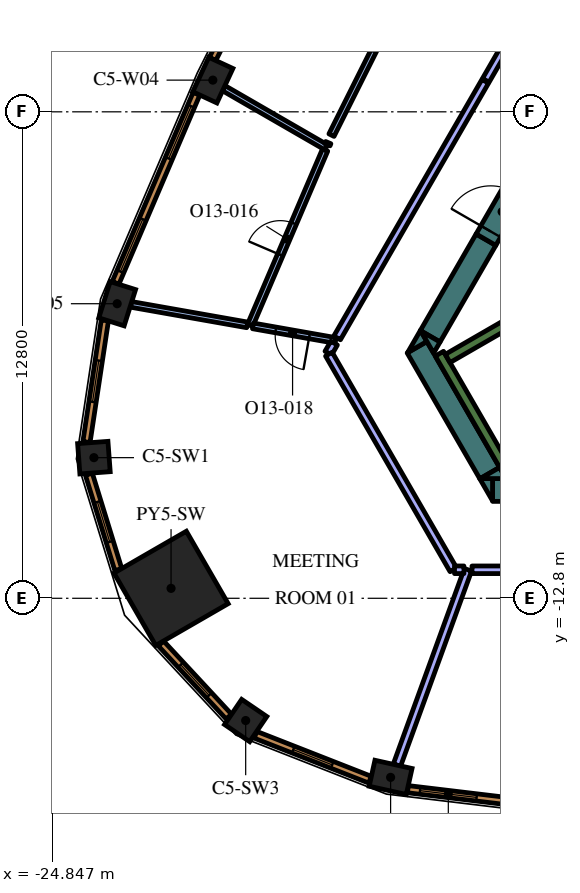
"""IFC4 building model, lengths in metres.
Left out: names, types, materials, properties, quantities, classifications, styles, units other than length and angle.
Written with IfcOpenShell. Run it as: python <this file> out.ifc"""

import sys

from ifc_helpers import new_model, si_unit, direction, frame, frame_2d, origin, origin_2d, place, context, subcontext, project, spatial, polyline, rectangle, outline, extrude, element, fill, save


model = new_model("IFC4")
c1 = context("Model", 3, precision=1e-05, world=origin(), true_north=direction((0.0, 1.0)))
c2 = subcontext(c1, "Body", "Model", "MODEL_VIEW")
j1 = project(units=[si_unit("LENGTHUNIT", "METRE"), si_unit("PLANEANGLEUNIT", "RADIAN")], contexts=[c1])
p1 = place(None, origin())
s1 = spatial("IfcSite", under=j1, at=p1, CompositionType="ELEMENT")
p2 = place(p1, origin())
s2 = spatial("IfcBuilding", under=s1, at=p2, CompositionType="ELEMENT")
p3 = place(p2, frame((0.0, 0.0, 300.6)))
s3 = spatial("IfcBuildingStorey", under=s2, at=p3, CompositionType="ELEMENT", Elevation=300.6)
p4 = place(p3, frame((-21.718, -12.539, 0.0), z_axis=(0.0, 0.0, 1.0), x_axis=(-0.866025403784, -0.5, 0.0)))
e1 = element("IfcColumn", 1, at=p4, inside=s3, PredefinedType="COLUMN", context=c2, shape_type="SweptSolid", body=[
    extrude(rectangle(XDim=2.2, YDim=2.2, at=origin_2d()), origin(), (0.0, 0.0, 1.0), 4.2),
])
for number, where, z_axis, x_axis in (
    (2, (-15.941, -17.512, 0.0), (0.0, 0.0, 1.0), (0.976, -0.217, 0.0)),
    (3, (-20.619, 0.834, 0.0), (0.0, 0.0, 1.0), (-0.421, -0.907, 0.0)),
    (4, (-23.136, -5.049, 0.0), (0.0, 0.0, 1.0), (-0.3, -0.954, 0.0)),
):
    element("IfcColumn", number, at=place(p3, frame(where, z_axis=z_axis, x_axis=x_axis)), inside=s3, PredefinedType="COLUMN", context=c2, shape_type="SweptSolid", body=[
        extrude(rectangle(XDim=1.0, YDim=0.7, at=origin_2d()), origin(), (0.0, 0.0, 1.0), 4.2),
    ])
for number, where, z_axis, x_axis in (
    (5, (-23.748, -9.1, 0.0), (0.0, 0.0, 1.0), (0.075, -0.997, 0.0)),
    (6, (-19.754, -16.017, 0.0), (0.0, 0.0, 1.0), (0.826, -0.563, 0.0)),
):
    element("IfcColumn", number, at=place(p3, frame(where, z_axis=z_axis, x_axis=x_axis)), inside=s3, PredefinedType="COLUMN", context=c2, shape_type="SweptSolid", body=[
        extrude(rectangle(XDim=0.8, YDim=0.8, at=origin_2d()), origin(), (0.0, 0.0, 1.0), 4.2),
    ])
p5 = place(p3, frame((8.904, -9.95, 0.0), z_axis=(0.0, 0.0, 1.0), x_axis=(-1.0, 0.0, 0.0)))
e7 = element("IfcWall", 7, at=p5, inside=s3, PredefinedType="SOLIDWALL", context=c2, shape_type="SweptSolid", body=[
    extrude(rectangle(XDim=22.161, YDim=0.6, at=frame_2d((11.081, 0.0))), origin(), (0.0, 0.0, 1.0), 4.2),
])
p6 = place(p3, origin())
e8 = element("IfcWall", 8, at=p6, inside=s3, PredefinedType="SOLIDWALL", context=c2, shape_type="SweptSolid", body=[
    extrude(outline(polyline([(-13.597, -9.65), (-13.259, -9.65), (-13.259, -10.236), (-13.597, -9.65)])), origin(), (0.0, 0.0, 1.0), 4.2),
])
p7 = place(p3, frame((-13.333, -9.506, 0.0), z_axis=(0.0, 0.0, 1.0), x_axis=(-0.500019073792, 0.866014391245, 0.0)))
e9 = element("IfcWall", 9, at=p7, inside=s3, PredefinedType="SOLIDWALL", context=c2, shape_type="SweptSolid", body=[
    extrude(rectangle(XDim=3.823, YDim=0.6, at=frame_2d((1.912, 0.0))), origin(), (0.0, 0.0, 1.0), 4.2),
])
e10 = element("IfcWall", 10, at=p6, inside=s3, PredefinedType="SOLIDWALL", context=c2, shape_type="SweptSolid", body=[
    extrude(outline(polyline([(-14.987, -6.043), (-15.493, -6.335), (-15.156, -5.75), (-14.987, -6.043)])), origin(), (0.0, 0.0, 1.0), 4.2),
])
e11 = element("IfcWall", 11, at=p6, inside=s3, PredefinedType="SOLIDWALL", context=c2, shape_type="SweptSolid", body=[
    extrude(outline(polyline([(-12.904, -9.65), (-13.58, -9.65), (-13.073, -9.357), (-12.904, -9.65)])), origin(), (0.0, 0.0, 1.0), 4.2),
])
p8 = place(p3, frame((-13.432, -3.364, 0.0), z_axis=(0.0, 0.0, 1.0), x_axis=(-0.499960127962, -0.866048422692, 0.0)))
e12 = element("IfcWall", 12, at=p8, inside=s3, PredefinedType="SOLIDWALL", context=c2, shape_type="SweptSolid", body=[
    extrude(rectangle(XDim=2.934, YDim=0.6, at=frame_2d((1.467, 0.0))), origin(), (0.0, 0.0, 1.0), 4.2),
])
e13 = element("IfcWall", 13, at=p6, inside=s3, PredefinedType="SOLIDWALL", context=c2, shape_type="SweptSolid", body=[
    extrude(outline(polyline([(-14.809, -6.35), (-15.147, -5.764), (-14.64, -6.057), (-14.809, -6.35)])), origin(), (0.0, 0.0, 1.0), 4.2),
])
p9 = place(p3, frame((-12.84, -9.511, 0.0), z_axis=(0.0, 0.0, 1.0), x_axis=(-0.499997733992, 0.866026712061, 0.0)))
e14 = element("IfcWall", 14, at=p9, inside=s3, PredefinedType="SOLIDWALL", context=c2, shape_type="SweptSolid", body=[
    extrude(rectangle(XDim=3.634, YDim=0.25, at=frame_2d((1.817, 0.0))), origin(), (0.0, 0.0, 1.0), 4.2),
])
p10 = place(p3, frame((-14.44, -6.49, 0.0), z_axis=(0.0, 0.0, 1.0), x_axis=(0.866022966069, 0.500004222222, 0.0)))
e15 = element("IfcWall", 15, at=p10, inside=s3, PredefinedType="SOLIDWALL", context=c2, shape_type="SweptSolid", body=[
    extrude(rectangle(XDim=6.8, YDim=0.25, at=frame_2d((3.4, 0.0))), origin(), (0.0, 0.0, 1.0), 4.2),
])
p11 = place(p3, frame((-13.432, -3.364, 0.0), z_axis=(0.0, 0.0, 1.0), x_axis=(0.500062241894, 0.865989465428, 0.0)))
e16 = element("IfcWall", 16, at=p11, inside=s3, PredefinedType="SOLIDWALL", context=c2, shape_type="SweptSolid", body=[
    extrude(rectangle(XDim=1.7, YDim=0.6, at=frame_2d((0.85, 0.0))), origin(), (0.0, 0.0, 1.0), 4.2),
])
p12 = place(p11, frame((0.25, 0.0, 0.0)))
e17 = element("IfcOpeningElement", 17, at=p12, cuts=e16, PredefinedType="OPENING", context=c2, shape_type="SweptSolid", body=[
    extrude(rectangle(XDim=1.2, YDim=2.1, at=frame_2d((0.6, 1.05))), frame((0.0, 0.31, 0.0), z_axis=(0.0, -1.0, 0.0), x_axis=(1.0, 0.0, 0.0)), (0.0, 0.0, 1.0), 0.62),
])
p13 = place(p3, frame((-15.774, -17.19, 0.0), z_axis=(0.0, 0.0, 1.0), x_axis=(0.341821907823, 0.93976474893, 0.0)))
e18 = element("IfcWall", 18, at=p13, inside=s3, PredefinedType="PARTITIONING", context=c2, shape_type="SweptSolid", body=[
    extrude(rectangle(XDim=5.469, YDim=0.2, at=frame_2d((2.735, 0.0))), origin(), (0.0, 0.0, 1.0), 3.55),
])
p14 = place(p3, frame((-13.799, -12.05, 0.0), z_axis=(0.0, 0.0, 1.0), x_axis=(1.0, 0.0, 0.0)))
e19 = element("IfcWall", 19, at=p14, inside=s3, PredefinedType="PARTITIONING", context=c2, shape_type="SweptSolid", body=[
    extrude(rectangle(XDim=7.769, YDim=0.2, at=frame_2d((3.884, 0.0))), origin(), (0.0, 0.0, 1.0), 3.55),
])
p15 = place(p14, frame((3.0, 0.0, 0.0)))
e20 = element("IfcOpeningElement", 20, at=p15, cuts=e19, PredefinedType="OPENING", context=c2, shape_type="SweptSolid", body=[
    extrude(rectangle(XDim=1.8, YDim=2.1, at=frame_2d((0.9, 1.05))), frame((0.0, 0.11, 0.0), z_axis=(0.0, -1.0, 0.0), x_axis=(1.0, 0.0, 0.0)), (0.0, 0.0, 1.0), 0.22),
])
p16 = place(p3, frame((-17.635, -0.936, 0.0), z_axis=(0.0, 0.0, 1.0), x_axis=(-0.866044607523, 0.499966736674, 0.0)))
e21 = element("IfcWall", 21, at=p16, inside=s3, PredefinedType="PARTITIONING", context=c2, shape_type="SweptSolid", body=[
    extrude(rectangle(XDim=3.115, YDim=0.15, at=frame_2d((1.557, 0.0))), origin(), (0.0, 0.0, 1.0), 3.55),
])
p17 = place(p3, frame((-17.497, -0.613, 0.0), z_axis=(0.0, 0.0, 1.0), x_axis=(0.447480081559, 0.89429389834, 0.0)))
e22 = element("IfcWall", 22, at=p17, inside=s3, PredefinedType="PARTITIONING", context=c2, shape_type="SweptSolid", body=[
    extrude(rectangle(XDim=5.863, YDim=0.15, at=frame_2d((2.931, 0.0))), origin(), (0.0, 0.0, 1.0), 3.55),
])
p18 = place(p17, frame((2.463, 0.0, 0.0)))
e23 = element("IfcOpeningElement", 23, at=p18, cuts=e22, PredefinedType="OPENING", context=c2, shape_type="SweptSolid", body=[
    extrude(rectangle(XDim=0.9, YDim=2.1, at=frame_2d((0.45, 1.05))), frame((0.0, 0.085, 0.0), z_axis=(0.0, -1.0, 0.0), x_axis=(1.0, 0.0, 0.0)), (0.0, 0.0, 1.0), 0.17),
])
p19 = place(p3, frame((-17.581, -0.81, 0.0), z_axis=(0.0, 0.0, 1.0), x_axis=(-0.390033474923, -0.92080067791, 0.0)))
e24 = element("IfcWall", 24, at=p19, inside=s3, PredefinedType="PARTITIONING", context=c2, shape_type="SweptSolid", body=[
    extrude(rectangle(XDim=0.061, YDim=0.15, at=frame_2d((0.03, 0.0))), origin(), (0.0, 0.0, 1.0), 3.55),
])
p20 = place(p3, frame((-19.639, -5.62, 0.0), z_axis=(0.0, 0.0, 1.0), x_axis=(0.393349802257, 0.919388891092, 0.0)))
e25 = element("IfcWall", 25, at=p20, inside=s3, PredefinedType="PARTITIONING", context=c2, shape_type="SweptSolid", body=[
    extrude(rectangle(XDim=5.019, YDim=0.15, at=frame_2d((2.51, 0.0))), origin(), (0.0, 0.0, 1.0), 3.55),
])
p21 = place(p20, frame((2.019, 0.0, 0.0)))
e26 = element("IfcOpeningElement", 26, at=p21, cuts=e25, PredefinedType="OPENING", context=c2, shape_type="SweptSolid", body=[
    extrude(rectangle(XDim=0.9, YDim=2.1, at=frame_2d((0.45, 1.05))), frame((0.0, 0.085, 0.0), z_axis=(0.0, -1.0, 0.0), x_axis=(1.0, 0.0, 0.0)), (0.0, 0.0, 1.0), 0.17),
])
p22 = place(p3, frame((-19.714, -5.606, 0.0), z_axis=(0.0, 0.0, 1.0), x_axis=(-0.984768527071, 0.173870492294, 0.0)))
e27 = element("IfcWall", 27, at=p22, inside=s3, PredefinedType="PARTITIONING", context=c2, shape_type="SweptSolid", body=[
    extrude(rectangle(XDim=3.107, YDim=0.15, at=frame_2d((1.554, 0.0))), origin(), (0.0, 0.0, 1.0), 3.55),
])
p23 = place(p3, frame((-17.388, -6.017, 0.0), z_axis=(0.0, 0.0, 1.0), x_axis=(-0.984764633635, 0.173892542513, 0.0)))
e28 = element("IfcWall", 28, at=p23, inside=s3, PredefinedType="PARTITIONING", context=c2, shape_type="SweptSolid", body=[
    extrude(rectangle(XDim=2.208, YDim=0.15, at=frame_2d((1.104, 0.0))), origin(), (0.0, 0.0, 1.0), 3.55),
])
p24 = place(p23, frame((0.7, 0.0, 0.0)))
e29 = element("IfcOpeningElement", 29, at=p24, cuts=e28, PredefinedType="OPENING", context=c2, shape_type="SweptSolid", body=[
    extrude(rectangle(XDim=0.9, YDim=2.1, at=frame_2d((0.45, 1.05))), frame((0.0, 0.085, 0.0), z_axis=(0.0, -1.0, 0.0), x_axis=(1.0, 0.0, 0.0)), (0.0, 0.0, 1.0), 0.17),
])
p25 = place(p3, frame((-7.436, 11.221, 0.0), z_axis=(0.0, 0.0, 1.0), x_axis=(-0.49999894854, -0.866026010844, 0.0)))
e30 = element("IfcWall", 30, at=p25, inside=s3, PredefinedType="PARTITIONING", context=c2, shape_type="SweptSolid", body=[
    extrude(rectangle(XDim=12.0, YDim=0.2, at=frame_2d((6.0, 0.0))), origin(), (0.0, 0.0, 1.0), 3.55),
])
p26 = place(p25, frame((5.5, 0.0, 0.0)))
e31 = element("IfcOpeningElement", 31, at=p26, cuts=e30, PredefinedType="OPENING", context=c2, shape_type="SweptSolid", body=[
    extrude(rectangle(XDim=1.0, YDim=2.1, at=frame_2d((0.5, 1.05))), frame((0.0, 0.11, 0.0), z_axis=(0.0, -1.0, 0.0), x_axis=(1.0, 0.0, 0.0)), (0.0, 0.0, 1.0), 0.22),
])
p27 = place(p3, frame((-13.451, 0.803, 0.0), z_axis=(0.0, 0.0, 1.0), x_axis=(-0.499979102685, -0.866037468519, 0.0)))
e32 = element("IfcWall", 32, at=p27, inside=s3, PredefinedType="PARTITIONING", context=c2, shape_type="SweptSolid", body=[
    extrude(rectangle(XDim=7.795, YDim=0.2, at=frame_2d((3.897, 0.0))), origin(), (0.0, 0.0, 1.0), 3.55),
])
p28 = place(p3, frame((-17.428, -6.086, 0.0), z_axis=(0.0, 0.0, 1.0), x_axis=(-0.499930512259, -0.866065518833, 0.0)))
e33 = element("IfcWall", 33, at=p28, inside=s3, PredefinedType="PARTITIONING", context=c2, shape_type="SweptSolid", body=[
    extrude(rectangle(XDim=0.305, YDim=0.2, at=frame_2d((0.152, 0.0))), origin(), (0.0, 0.0, 1.0), 3.55),
])
p29 = place(p3, frame((-17.565, -6.376, 0.0), z_axis=(0.0, 0.0, 1.0), x_axis=(0.499994477444, -0.86602859221, 0.0)))
e34 = element("IfcWall", 34, at=p29, inside=s3, PredefinedType="PARTITIONING", context=c2, shape_type="SweptSolid", body=[
    extrude(rectangle(XDim=6.552, YDim=0.2, at=frame_2d((3.276, 0.0))), origin(), (0.0, 0.0, 1.0), 3.55),
])
p30 = place(p3, frame((-14.26, -12.05, 0.0), z_axis=(0.0, 0.0, 1.0), x_axis=(1.0, 0.0, 0.0)))
e35 = element("IfcWall", 35, at=p30, inside=s3, PredefinedType="PARTITIONING", context=c2, shape_type="SweptSolid", body=[
    extrude(rectangle(XDim=0.248, YDim=0.2, at=frame_2d((0.124, 0.0))), origin(), (0.0, 0.0, 1.0), 3.55),
])
p31 = place(p3, frame((-15.487, -17.823, 0.0), z_axis=(0.0, 0.0, 1.0), x_axis=(0.992885582795, -0.119072328769, 0.0)))
e36 = element("IfcWall", 36, at=p31, inside=s3, PredefinedType="SOLIDWALL", context=c2, shape_type="SweptSolid", body=[
    extrude(rectangle(XDim=5.415, YDim=0.19, at=frame_2d((2.708, 0.0))), origin(), (0.0, 0.0, 1.0), 3.95),
])
p32 = place(p31, frame((0.323, 0.0, 0.6)))
e37 = element("IfcOpeningElement", 37, at=p32, cuts=e36, PredefinedType="OPENING", context=c2, shape_type="SweptSolid", body=[
    extrude(rectangle(XDim=1.5, YDim=2.85, at=frame_2d((0.75, 1.425))), frame((0.0, 0.105, 0.0), z_axis=(0.0, -1.0, 0.0), x_axis=(1.0, 0.0, 0.0)), (0.0, 0.0, 1.0), 0.21),
])
p33 = place(p31, frame((3.558, 0.0, 0.6)))
e38 = element("IfcOpeningElement", 38, at=p33, cuts=e36, PredefinedType="OPENING", context=c2, shape_type="SweptSolid", body=[
    extrude(rectangle(XDim=1.5, YDim=2.85, at=frame_2d((0.75, 1.425))), frame((0.0, 0.105, 0.0), z_axis=(0.0, -1.0, 0.0), x_axis=(1.0, 0.0, 0.0)), (0.0, 0.0, 1.0), 0.21),
])
p34 = place(p3, frame((-18.206, 6.227, 0.0), z_axis=(0.0, 0.0, 1.0), x_axis=(-0.447484531401, -0.894291671747, 0.0)))
e39 = element("IfcWall", 39, at=p34, inside=s3, PredefinedType="SOLIDWALL", context=c2, shape_type="SweptSolid", body=[
    extrude(rectangle(XDim=5.406, YDim=0.19, at=frame_2d((2.703, 0.0))), origin(), (0.0, 0.0, 1.0), 3.95),
])
p35 = place(p34, frame((0.346, 0.0, 0.6)))
e40 = element("IfcOpeningElement", 40, at=p35, cuts=e39, PredefinedType="OPENING", context=c2, shape_type="SweptSolid", body=[
    extrude(rectangle(XDim=1.5, YDim=2.85, at=frame_2d((0.75, 1.425))), frame((0.0, 0.105, 0.0), z_axis=(0.0, -1.0, 0.0), x_axis=(1.0, 0.0, 0.0)), (0.0, 0.0, 1.0), 0.21),
])
p36 = place(p34, frame((3.559, 0.0, 0.6)))
e41 = element("IfcOpeningElement", 41, at=p36, cuts=e39, PredefinedType="OPENING", context=c2, shape_type="SweptSolid", body=[
    extrude(rectangle(XDim=1.5, YDim=2.85, at=frame_2d((0.75, 1.425))), frame((0.0, 0.105, 0.0), z_axis=(0.0, -1.0, 0.0), x_axis=(1.0, 0.0, 0.0)), (0.0, 0.0, 1.0), 0.21),
])
p37 = place(p3, frame((-21.049, 0.478, 0.0), z_axis=(0.0, 0.0, 1.0), x_axis=(-0.393347848476, -0.919389726992, 0.0)))
e42 = element("IfcWall", 42, at=p37, inside=s3, PredefinedType="SOLIDWALL", context=c2, shape_type="SweptSolid", body=[
    extrude(rectangle(XDim=5.415, YDim=0.19, at=frame_2d((2.708, 0.0))), origin(), (0.0, 0.0, 1.0), 3.95),
])
p38 = place(p37, frame((0.357, 0.0, 0.6)))
e43 = element("IfcOpeningElement", 43, at=p38, cuts=e42, PredefinedType="OPENING", context=c2, shape_type="SweptSolid", body=[
    extrude(rectangle(XDim=1.5, YDim=2.85, at=frame_2d((0.75, 1.425))), frame((0.0, 0.105, 0.0), z_axis=(0.0, -1.0, 0.0), x_axis=(1.0, 0.0, 0.0)), (0.0, 0.0, 1.0), 0.21),
])
p39 = place(p37, frame((3.593, 0.0, 0.6)))
e44 = element("IfcOpeningElement", 44, at=p39, cuts=e42, PredefinedType="OPENING", context=c2, shape_type="SweptSolid", body=[
    extrude(rectangle(XDim=1.5, YDim=2.85, at=frame_2d((0.75, 1.425))), frame((0.0, 0.105, 0.0), z_axis=(0.0, -1.0, 0.0), x_axis=(1.0, 0.0, 0.0)), (0.0, 0.0, 1.0), 0.21),
])
p40 = place(p3, frame((-23.46, -5.488, 0.0), z_axis=(0.0, 0.0, 1.0), x_axis=(-0.149421055602, -0.988773658702, 0.0)))
e45 = element("IfcWall", 45, at=p40, inside=s3, PredefinedType="SOLIDWALL", context=c2, shape_type="SweptSolid", body=[
    extrude(rectangle(XDim=3.237, YDim=0.19, at=frame_2d((1.618, 0.0))), origin(), (0.0, 0.0, 1.0), 3.95),
])
p41 = place(p40, frame((1.068, 0.0, 0.6)))
e46 = element("IfcOpeningElement", 46, at=p41, cuts=e45, PredefinedType="OPENING", context=c2, shape_type="SweptSolid", body=[
    extrude(rectangle(XDim=1.1, YDim=2.85, at=frame_2d((0.55, 1.425))), frame((0.0, 0.105, 0.0), z_axis=(0.0, -1.0, 0.0), x_axis=(1.0, 0.0, 0.0)), (0.0, 0.0, 1.0), 0.21),
])
p42 = place(p3, frame((-23.881, -9.535, 0.0), z_axis=(0.0, 0.0, 1.0), x_axis=(0.294706210429, -0.9555879078, 0.0)))
e47 = element("IfcWall", 47, at=p42, inside=s3, PredefinedType="SOLIDWALL", context=c2, shape_type="SweptSolid", body=[
    extrude(rectangle(XDim=2.627, YDim=0.19, at=frame_2d((1.313, 0.0))), origin(), (0.0, 0.0, 1.0), 3.95),
])
p43 = place(p42, frame((0.763, 0.0, 0.6)))
e48 = element("IfcOpeningElement", 48, at=p43, cuts=e47, PredefinedType="OPENING", context=c2, shape_type="SweptSolid", body=[
    extrude(rectangle(XDim=1.1, YDim=2.85, at=frame_2d((0.55, 1.425))), frame((0.0, 0.105, 0.0), z_axis=(0.0, -1.0, 0.0), x_axis=(1.0, 0.0, 0.0)), (0.0, 0.0, 1.0), 0.21),
])
p44 = place(p3, frame((-21.985, -13.988, 0.0), z_axis=(0.0, 0.0, 1.0), x_axis=(0.680219354823, -0.733008614768, 0.0)))
e49 = element("IfcWall", 49, at=p44, inside=s3, PredefinedType="SOLIDWALL", context=c2, shape_type="SweptSolid", body=[
    extrude(rectangle(XDim=2.627, YDim=0.19, at=frame_2d((1.313, 0.0))), origin(), (0.0, 0.0, 1.0), 3.95),
])
p45 = place(p44, frame((0.763, 0.0, 0.6)))
e50 = element("IfcOpeningElement", 50, at=p45, cuts=e49, PredefinedType="OPENING", context=c2, shape_type="SweptSolid", body=[
    extrude(rectangle(XDim=1.1, YDim=2.85, at=frame_2d((0.55, 1.425))), frame((0.0, 0.105, 0.0), z_axis=(0.0, -1.0, 0.0), x_axis=(1.0, 0.0, 0.0)), (0.0, 0.0, 1.0), 0.21),
])
p46 = place(p3, frame((-19.496, -16.392, 0.0), z_axis=(0.0, 0.0, 1.0), x_axis=(0.93100888477, -0.364996515709, 0.0)))
e51 = element("IfcWall", 51, at=p46, inside=s3, PredefinedType="SOLIDWALL", context=c2, shape_type="SweptSolid", body=[
    extrude(rectangle(XDim=3.237, YDim=0.19, at=frame_2d((1.618, 0.0))), origin(), (0.0, 0.0, 1.0), 3.95),
])
p47 = place(p46, frame((1.068, 0.0, 0.6)))
e52 = element("IfcOpeningElement", 52, at=p47, cuts=e51, PredefinedType="OPENING", context=c2, shape_type="SweptSolid", body=[
    extrude(rectangle(XDim=1.1, YDim=2.85, at=frame_2d((0.55, 1.425))), frame((0.0, 0.105, 0.0), z_axis=(0.0, -1.0, 0.0), x_axis=(1.0, 0.0, 0.0)), (0.0, 0.0, 1.0), 0.21),
])
p48 = place(p12, origin())
e53 = element("IfcDoor", 53, at=p48, inside=s3, OperationType="SINGLE_SWING_LEFT", PredefinedType="DOOR", context=c2, shape_type="SweptSolid", body=[
    extrude(rectangle(XDim=1.2, YDim=2.1, at=frame_2d((0.6, 1.05))), frame((0.0, 0.025, 0.0), z_axis=(0.0, -1.0, 0.0), x_axis=(1.0, 0.0, 0.0)), (0.0, 0.0, 1.0), 0.05),
])
fill(e17, e53)
p49 = place(p21, origin())
e54 = element("IfcDoor", 54, at=p49, inside=s3, OperationType="SINGLE_SWING_LEFT", PredefinedType="DOOR", context=c2, shape_type="SweptSolid", body=[
    extrude(rectangle(XDim=0.9, YDim=2.1, at=frame_2d((0.45, 1.05))), frame((0.0, 0.025, 0.0), z_axis=(0.0, -1.0, 0.0), x_axis=(1.0, 0.0, 0.0)), (0.0, 0.0, 1.0), 0.05),
])
fill(e26, e54)
p50 = place(p24, origin())
e55 = element("IfcDoor", 55, at=p50, inside=s3, OperationType="SINGLE_SWING_RIGHT", PredefinedType="DOOR", context=c2, shape_type="SweptSolid", body=[
    extrude(rectangle(XDim=0.9, YDim=2.1, at=frame_2d((0.45, 1.05))), frame((0.0, 0.025, 0.0), z_axis=(0.0, -1.0, 0.0), x_axis=(1.0, 0.0, 0.0)), (0.0, 0.0, 1.0), 0.05),
])
fill(e29, e55)
p51 = place(p32, origin())
e56 = element("IfcWindow", 56, at=p51, inside=s3, PartitioningType="SINGLE_PANEL", PredefinedType="WINDOW", context=c2, shape_type="SweptSolid", body=[
    extrude(rectangle(XDim=1.5, YDim=2.85, at=frame_2d((0.75, 1.425))), frame((0.0, 0.045, 0.0), z_axis=(0.0, -1.0, 0.0), x_axis=(1.0, 0.0, 0.0)), (0.0, 0.0, 1.0), 0.06),
])
fill(e37, e56)
p52 = place(p38, origin())
e57 = element("IfcWindow", 57, at=p52, inside=s3, PartitioningType="SINGLE_PANEL", PredefinedType="WINDOW", context=c2, shape_type="SweptSolid", body=[
    extrude(rectangle(XDim=1.5, YDim=2.85, at=frame_2d((0.75, 1.425))), frame((0.0, 0.045, 0.0), z_axis=(0.0, -1.0, 0.0), x_axis=(1.0, 0.0, 0.0)), (0.0, 0.0, 1.0), 0.06),
])
fill(e43, e57)
p53 = place(p39, origin())
e58 = element("IfcWindow", 58, at=p53, inside=s3, PartitioningType="SINGLE_PANEL", PredefinedType="WINDOW", context=c2, shape_type="SweptSolid", body=[
    extrude(rectangle(XDim=1.5, YDim=2.85, at=frame_2d((0.75, 1.425))), frame((0.0, 0.045, 0.0), z_axis=(0.0, -1.0, 0.0), x_axis=(1.0, 0.0, 0.0)), (0.0, 0.0, 1.0), 0.06),
])
fill(e44, e58)
p54 = place(p41, origin())
e59 = element("IfcWindow", 59, at=p54, inside=s3, PartitioningType="SINGLE_PANEL", PredefinedType="WINDOW", context=c2, shape_type="SweptSolid", body=[
    extrude(rectangle(XDim=1.1, YDim=2.85, at=frame_2d((0.55, 1.425))), frame((0.0, 0.045, 0.0), z_axis=(0.0, -1.0, 0.0), x_axis=(1.0, 0.0, 0.0)), (0.0, 0.0, 1.0), 0.06),
])
fill(e46, e59)
p55 = place(p43, origin())
e60 = element("IfcWindow", 60, at=p55, inside=s3, PartitioningType="SINGLE_PANEL", PredefinedType="WINDOW", context=c2, shape_type="SweptSolid", body=[
    extrude(rectangle(XDim=1.1, YDim=2.85, at=frame_2d((0.55, 1.425))), frame((0.0, 0.045, 0.0), z_axis=(0.0, -1.0, 0.0), x_axis=(1.0, 0.0, 0.0)), (0.0, 0.0, 1.0), 0.06),
])
fill(e48, e60)
p56 = place(p45, origin())
e61 = element("IfcWindow", 61, at=p56, inside=s3, PartitioningType="SINGLE_PANEL", PredefinedType="WINDOW", context=c2, shape_type="SweptSolid", body=[
    extrude(rectangle(XDim=1.1, YDim=2.85, at=frame_2d((0.55, 1.425))), frame((0.0, 0.045, 0.0), z_axis=(0.0, -1.0, 0.0), x_axis=(1.0, 0.0, 0.0)), (0.0, 0.0, 1.0), 0.06),
])
fill(e50, e61)
p57 = place(p47, origin())
e62 = element("IfcWindow", 62, at=p57, inside=s3, PartitioningType="SINGLE_PANEL", PredefinedType="WINDOW", context=c2, shape_type="SweptSolid", body=[
    extrude(rectangle(XDim=1.1, YDim=2.85, at=frame_2d((0.55, 1.425))), frame((0.0, 0.045, 0.0), z_axis=(0.0, -1.0, 0.0), x_axis=(1.0, 0.0, 0.0)), (0.0, 0.0, 1.0), 0.06),
])
fill(e52, e62)
save(model, sys.argv[1])
